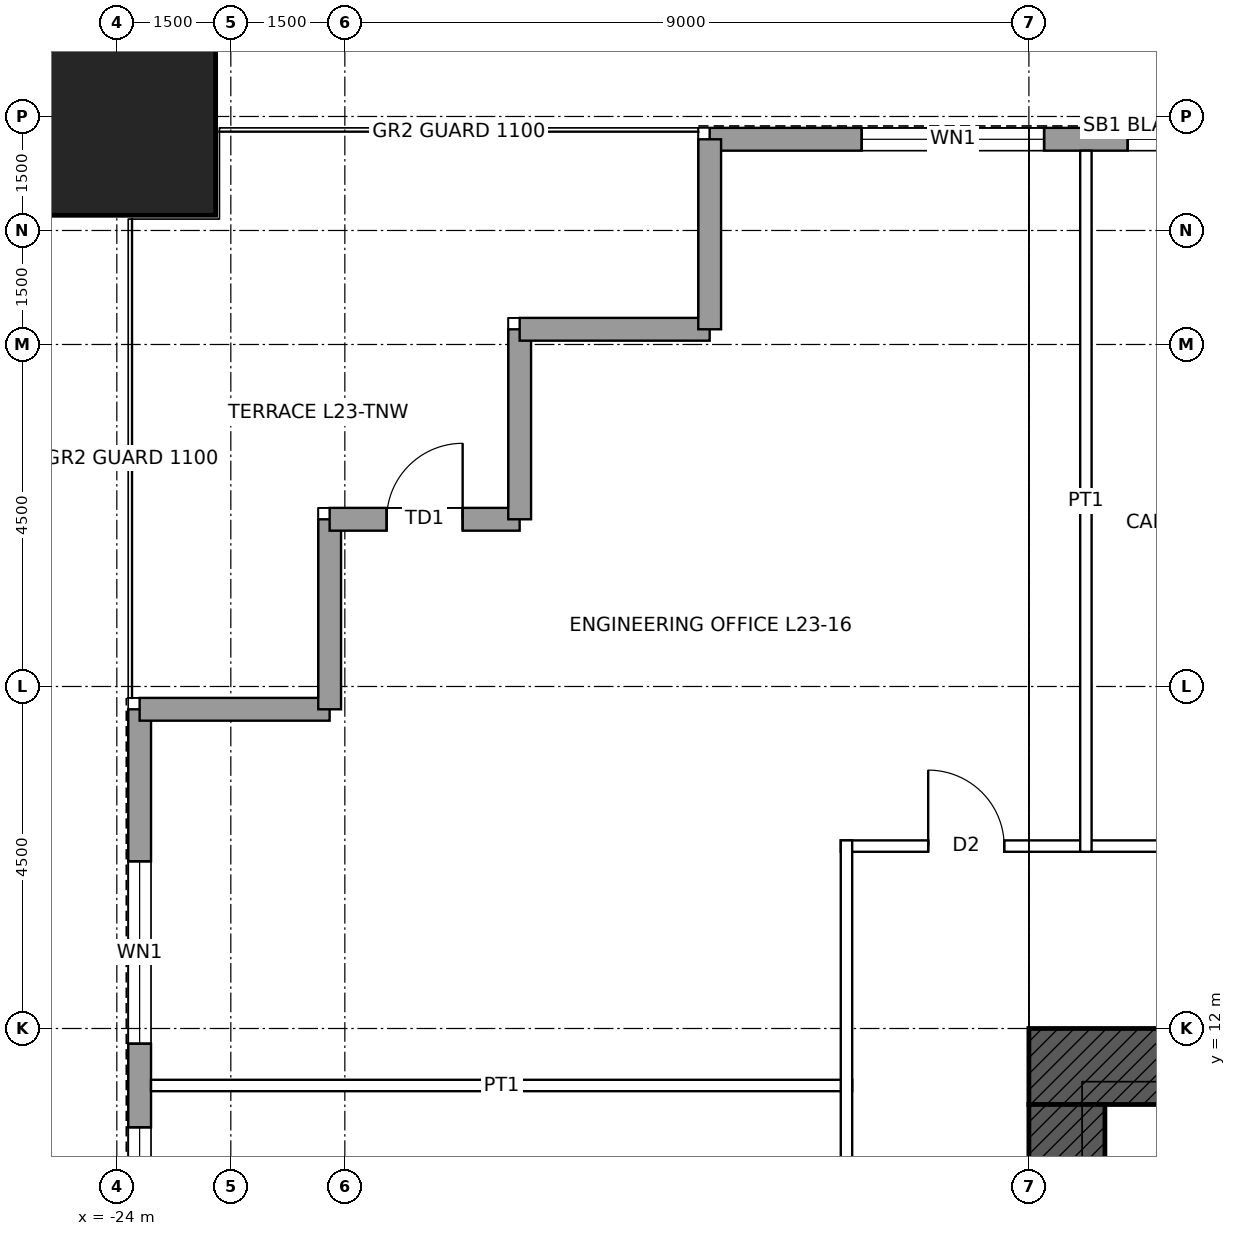
"""IFC4 building model, lengths in metres.
Left out: names, types, materials, properties, quantities, classifications, styles, units other than length and angle.
Written with IfcOpenShell. Run it as: python <this file> out.ifc"""

import sys

from ifc_helpers import new_model, si_unit, direction, frame, frame_2d, origin, origin_2d, place, context, subcontext, project, spatial, rectangle, hollow_rectangle, extrude, element, fill, save


model = new_model("IFC4")
c1 = context("Model", 3, precision=1e-05, world=origin(), true_north=direction((0.0, 1.0)))
c2 = subcontext(c1, "Body", "Model", "MODEL_VIEW")
j1 = project(units=[si_unit("LENGTHUNIT", "METRE"), si_unit("PLANEANGLEUNIT", "RADIAN")], contexts=[c1])
p1 = place(None, origin())
s1 = spatial("IfcSite", under=j1, at=p1, CompositionType="ELEMENT")
p2 = place(p1, origin())
s2 = spatial("IfcBuilding", under=s1, at=p2, CompositionType="ELEMENT")
p3 = place(p2, frame((0.0, 0.0, 117.9)))
s3 = spatial("IfcBuildingStorey", under=s2, at=p3, CompositionType="ELEMENT", Elevation=117.9)
p4 = place(p3, frame((-24.0, 24.0, 0.0), z_axis=(0.0, 0.0, 1.0), x_axis=(1.0, 0.0, 0.0)))
e1 = element("IfcColumn", 1, at=p4, inside=s3, PredefinedType="COLUMN", context=c2, shape_type="SweptSolid", body=[
    extrude(hollow_rectangle(XDim=2.6, YDim=2.6, WallThickness=0.13, at=origin_2d()), origin(), (0.0, 0.0, 1.0), 4.5),
])
p5 = place(p3, frame((-12.0, 11.5, 0.0), z_axis=(0.0, 0.0, 1.0), x_axis=(1.0, 0.0, 0.0)))
e2 = element("IfcWall", 2, at=p5, inside=s3, PredefinedType="SHEAR", context=c2, shape_type="SweptSolid", body=[
    extrude(rectangle(XDim=24.0, YDim=1.0, at=frame_2d((12.0, 0.0))), origin(), (0.0, 0.0, 1.0), 4.5),
])
p6 = place(p5, frame((6.25, 0.0, 0.0)))
e3 = element("IfcOpeningElement", 3, at=p6, cuts=e2, PredefinedType="OPENING", context=c2, shape_type="SweptSolid", body=[
    extrude(rectangle(XDim=1.0, YDim=2.4, at=frame_2d((0.5, 1.2))), frame((0.0, 0.51, 0.0), z_axis=(0.0, -1.0, 0.0), x_axis=(1.0, 0.0, 0.0)), (0.0, 0.0, 1.0), 1.02),
])
p7 = place(p5, frame((16.75, 0.0, 0.0)))
e4 = element("IfcOpeningElement", 4, at=p7, cuts=e2, PredefinedType="OPENING", context=c2, shape_type="SweptSolid", body=[
    extrude(rectangle(XDim=1.0, YDim=2.4, at=frame_2d((0.5, 1.2))), frame((0.0, 0.51, 0.0), z_axis=(0.0, -1.0, 0.0), x_axis=(1.0, 0.0, 0.0)), (0.0, 0.0, 1.0), 1.02),
])
p8 = place(p3, frame((-11.5, -11.0, 0.0), z_axis=(0.0, 0.0, 1.0), x_axis=(0.0, 1.0, 0.0)))
e5 = element("IfcWall", 5, at=p8, inside=s3, PredefinedType="SHEAR", context=c2, shape_type="SweptSolid", body=[
    extrude(rectangle(XDim=22.0, YDim=1.0, at=frame_2d((11.0, 0.0))), origin(), (0.0, 0.0, 1.0), 4.5),
])
p9 = place(p8, frame((10.5, 0.0, 0.0)))
e6 = element("IfcOpeningElement", 6, at=p9, cuts=e5, PredefinedType="OPENING", context=c2, shape_type="SweptSolid", body=[
    extrude(rectangle(XDim=1.0, YDim=2.4, at=frame_2d((0.5, 1.2))), frame((0.0, 0.51, 0.0), z_axis=(0.0, -1.0, 0.0), x_axis=(1.0, 0.0, 0.0)), (0.0, 0.0, 1.0), 1.02),
])
p10 = place(p3, frame((-16.2, 23.7, 0.0), z_axis=(0.0, 0.0, 1.0), x_axis=(1.0, 0.0, 0.0)))
e7 = element("IfcWall", 7, at=p10, inside=s3, PredefinedType="SOLIDWALL", context=c2, shape_type="SweptSolid", body=[
    extrude(rectangle(XDim=32.4, YDim=0.3, at=frame_2d((16.2, 0.0))), origin(), (0.0, 0.0, 1.0), 4.3),
])
p11 = place(p10, frame((2.0, 0.0, 1.0)))
e8 = element("IfcOpeningElement", 8, at=p11, cuts=e7, PredefinedType="OPENING", context=c2, shape_type="SweptSolid", body=[
    extrude(rectangle(XDim=2.4, YDim=1.2, at=frame_2d((1.2, 0.6))), frame((0.0, 0.16, 0.0), z_axis=(0.0, -1.0, 0.0), x_axis=(1.0, 0.0, 0.0)), (0.0, 0.0, 1.0), 0.32),
])
p12 = place(p10, frame((5.5, 0.0, 1.0)))
e9 = element("IfcOpeningElement", 9, at=p12, cuts=e7, PredefinedType="OPENING", context=c2, shape_type="SweptSolid", body=[
    extrude(rectangle(XDim=2.4, YDim=1.2, at=frame_2d((1.2, 0.6))), frame((0.0, 0.16, 0.0), z_axis=(0.0, -1.0, 0.0), x_axis=(1.0, 0.0, 0.0)), (0.0, 0.0, 1.0), 0.32),
])
p13 = place(p10, frame((8.45, 0.0, 1.0)))
e10 = element("IfcOpeningElement", 10, at=p13, cuts=e7, PredefinedType="OPENING", context=c2, shape_type="SweptSolid", body=[
    extrude(rectangle(XDim=1.8, YDim=1.2, at=frame_2d((0.9, 0.6))), frame((0.0, 0.16, 0.0), z_axis=(0.0, -1.0, 0.0), x_axis=(1.0, 0.0, 0.0)), (0.0, 0.0, 1.0), 0.32),
])
p14 = place(p10, frame((10.55, 0.0, 1.0)))
e11 = element("IfcOpeningElement", 11, at=p14, cuts=e7, PredefinedType="OPENING", context=c2, shape_type="SweptSolid", body=[
    extrude(rectangle(XDim=1.8, YDim=1.2, at=frame_2d((0.9, 0.6))), frame((0.0, 0.16, 0.0), z_axis=(0.0, -1.0, 0.0), x_axis=(1.0, 0.0, 0.0)), (0.0, 0.0, 1.0), 0.32),
])
p15 = place(p10, frame((15.6, 0.0, 1.0)))
e12 = element("IfcOpeningElement", 12, at=p15, cuts=e7, PredefinedType="OPENING", context=c2, shape_type="SweptSolid", body=[
    extrude(rectangle(XDim=1.8, YDim=1.2, at=frame_2d((0.9, 0.6))), frame((0.0, 0.16, 0.0), z_axis=(0.0, -1.0, 0.0), x_axis=(1.0, 0.0, 0.0)), (0.0, 0.0, 1.0), 0.32),
])
p16 = place(p10, frame((20.5, 0.0, 1.0)))
e13 = element("IfcOpeningElement", 13, at=p16, cuts=e7, PredefinedType="OPENING", context=c2, shape_type="SweptSolid", body=[
    extrude(rectangle(XDim=2.4, YDim=1.2, at=frame_2d((1.2, 0.6))), frame((0.0, 0.16, 0.0), z_axis=(0.0, -1.0, 0.0), x_axis=(1.0, 0.0, 0.0)), (0.0, 0.0, 1.0), 0.32),
])
p17 = place(p10, frame((24.5, 0.0, 1.0)))
e14 = element("IfcOpeningElement", 14, at=p17, cuts=e7, PredefinedType="OPENING", context=c2, shape_type="SweptSolid", body=[
    extrude(rectangle(XDim=2.4, YDim=1.2, at=frame_2d((1.2, 0.6))), frame((0.0, 0.16, 0.0), z_axis=(0.0, -1.0, 0.0), x_axis=(1.0, 0.0, 0.0)), (0.0, 0.0, 1.0), 0.32),
])
p18 = place(p10, frame((28.0, 0.0, 1.0)))
e15 = element("IfcOpeningElement", 15, at=p18, cuts=e7, PredefinedType="OPENING", context=c2, shape_type="SweptSolid", body=[
    extrude(rectangle(XDim=2.4, YDim=1.2, at=frame_2d((1.2, 0.6))), frame((0.0, 0.16, 0.0), z_axis=(0.0, -1.0, 0.0), x_axis=(1.0, 0.0, 0.0)), (0.0, 0.0, 1.0), 0.32),
])
p19 = place(p3, frame((-23.7, -16.2, 0.0), z_axis=(0.0, 0.0, 1.0), x_axis=(0.0, 1.0, 0.0)))
e16 = element("IfcWall", 16, at=p19, inside=s3, PredefinedType="SOLIDWALL", context=c2, shape_type="SweptSolid", body=[
    extrude(rectangle(XDim=32.4, YDim=0.3, at=frame_2d((16.2, 0.0))), origin(), (0.0, 0.0, 1.0), 4.3),
])
p20 = place(p19, frame((2.0, 0.0, 1.0)))
e17 = element("IfcOpeningElement", 17, at=p20, cuts=e16, PredefinedType="OPENING", context=c2, shape_type="SweptSolid", body=[
    extrude(rectangle(XDim=2.4, YDim=1.2, at=frame_2d((1.2, 0.6))), frame((0.0, 0.16, 0.0), z_axis=(0.0, -1.0, 0.0), x_axis=(1.0, 0.0, 0.0)), (0.0, 0.0, 1.0), 0.32),
])
p21 = place(p19, frame((5.5, 0.0, 1.0)))
e18 = element("IfcOpeningElement", 18, at=p21, cuts=e16, PredefinedType="OPENING", context=c2, shape_type="SweptSolid", body=[
    extrude(rectangle(XDim=2.4, YDim=1.2, at=frame_2d((1.2, 0.6))), frame((0.0, 0.16, 0.0), z_axis=(0.0, -1.0, 0.0), x_axis=(1.0, 0.0, 0.0)), (0.0, 0.0, 1.0), 0.32),
])
p22 = place(p19, frame((9.5, 0.0, 1.0)))
e19 = element("IfcOpeningElement", 19, at=p22, cuts=e16, PredefinedType="OPENING", context=c2, shape_type="SweptSolid", body=[
    extrude(rectangle(XDim=2.4, YDim=1.2, at=frame_2d((1.2, 0.6))), frame((0.0, 0.16, 0.0), z_axis=(0.0, -1.0, 0.0), x_axis=(1.0, 0.0, 0.0)), (0.0, 0.0, 1.0), 0.32),
])
p23 = place(p19, frame((15.0, 0.0, 1.0)))
e20 = element("IfcOpeningElement", 20, at=p23, cuts=e16, PredefinedType="OPENING", context=c2, shape_type="SweptSolid", body=[
    extrude(rectangle(XDim=1.8, YDim=1.2, at=frame_2d((0.9, 0.6))), frame((0.0, 0.16, 0.0), z_axis=(0.0, -1.0, 0.0), x_axis=(1.0, 0.0, 0.0)), (0.0, 0.0, 1.0), 0.32),
])
p24 = place(p19, frame((20.05, 0.0, 1.0)))
e21 = element("IfcOpeningElement", 21, at=p24, cuts=e16, PredefinedType="OPENING", context=c2, shape_type="SweptSolid", body=[
    extrude(rectangle(XDim=1.8, YDim=1.2, at=frame_2d((0.9, 0.6))), frame((0.0, 0.16, 0.0), z_axis=(0.0, -1.0, 0.0), x_axis=(1.0, 0.0, 0.0)), (0.0, 0.0, 1.0), 0.32),
])
p25 = place(p19, frame((22.15, 0.0, 1.0)))
e22 = element("IfcOpeningElement", 22, at=p25, cuts=e16, PredefinedType="OPENING", context=c2, shape_type="SweptSolid", body=[
    extrude(rectangle(XDim=1.8, YDim=1.2, at=frame_2d((0.9, 0.6))), frame((0.0, 0.16, 0.0), z_axis=(0.0, -1.0, 0.0), x_axis=(1.0, 0.0, 0.0)), (0.0, 0.0, 1.0), 0.32),
])
p26 = place(p19, frame((24.5, 0.0, 1.0)))
e23 = element("IfcOpeningElement", 23, at=p26, cuts=e16, PredefinedType="OPENING", context=c2, shape_type="SweptSolid", body=[
    extrude(rectangle(XDim=2.4, YDim=1.2, at=frame_2d((1.2, 0.6))), frame((0.0, 0.16, 0.0), z_axis=(0.0, -1.0, 0.0), x_axis=(1.0, 0.0, 0.0)), (0.0, 0.0, 1.0), 0.32),
])
p27 = place(p19, frame((28.0, 0.0, 1.0)))
e24 = element("IfcOpeningElement", 24, at=p27, cuts=e16, PredefinedType="OPENING", context=c2, shape_type="SweptSolid", body=[
    extrude(rectangle(XDim=2.4, YDim=1.2, at=frame_2d((1.2, 0.6))), frame((0.0, 0.16, 0.0), z_axis=(0.0, -1.0, 0.0), x_axis=(1.0, 0.0, 0.0)), (0.0, 0.0, 1.0), 0.32),
])
for number, where, z_axis, x_axis in (
    (25, (-23.7, 16.2, 0.0), (0.0, 0.0, 1.0), (1.0, 0.0, 0.0)),
    (26, (-21.2, 16.2, 0.0), (0.0, 0.0, 1.0), (0.0, 1.0, 0.0)),
):
    element("IfcWall", number, at=place(p3, frame(where, z_axis=z_axis, x_axis=x_axis)), inside=s3, PredefinedType="SOLIDWALL", context=c2, shape_type="SweptSolid", body=[
        extrude(rectangle(XDim=2.5, YDim=0.3, at=frame_2d((1.25, 0.0))), origin(), (0.0, 0.0, 1.0), 4.3),
    ])
p28 = place(p3, frame((-21.2, 18.7, 0.0), z_axis=(0.0, 0.0, 1.0), x_axis=(1.0, 0.0, 0.0)))
e27 = element("IfcWall", 27, at=p28, inside=s3, PredefinedType="SOLIDWALL", context=c2, shape_type="SweptSolid", body=[
    extrude(rectangle(XDim=2.5, YDim=0.3, at=frame_2d((1.25, 0.0))), origin(), (0.0, 0.0, 1.0), 4.3),
])
p29 = place(p28, frame((0.75, 0.0, 0.0)))
e28 = element("IfcOpeningElement", 28, at=p29, cuts=e27, PredefinedType="OPENING", context=c2, shape_type="SweptSolid", body=[
    extrude(rectangle(XDim=1.0, YDim=2.4, at=frame_2d((0.5, 1.2))), frame((0.0, 0.16, 0.0), z_axis=(0.0, -1.0, 0.0), x_axis=(1.0, 0.0, 0.0)), (0.0, 0.0, 1.0), 0.32),
])
for number, where, z_axis, x_axis in (
    (29, (-18.7, 18.7, 0.0), (0.0, 0.0, 1.0), (0.0, 1.0, 0.0)),
    (30, (-18.7, 21.2, 0.0), (0.0, 0.0, 1.0), (1.0, 0.0, 0.0)),
    (31, (-16.2, 21.2, 0.0), (0.0, 0.0, 1.0), (0.0, 1.0, 0.0)),
):
    element("IfcWall", number, at=place(p3, frame(where, z_axis=z_axis, x_axis=x_axis)), inside=s3, PredefinedType="SOLIDWALL", context=c2, shape_type="SweptSolid", body=[
        extrude(rectangle(XDim=2.5, YDim=0.3, at=frame_2d((1.25, 0.0))), origin(), (0.0, 0.0, 1.0), 4.3),
    ])
p30 = place(p3, frame((-23.55, 11.25, 0.0), z_axis=(0.0, 0.0, 1.0), x_axis=(1.0, 0.0, 0.0)))
e32 = element("IfcWall", 32, at=p30, inside=s3, PredefinedType="PARTITIONING", context=c2, shape_type="SweptSolid", body=[
    extrude(rectangle(XDim=9.225, YDim=0.15, at=frame_2d((4.613, 0.0))), origin(), (0.0, 0.0, 1.0), 3.431),
])
p31 = place(p3, frame((-14.475, 14.4, 0.0), z_axis=(0.0, 0.0, 1.0), x_axis=(1.0, 0.0, 0.0)))
e33 = element("IfcWall", 33, at=p31, inside=s3, PredefinedType="PARTITIONING", context=c2, shape_type="SweptSolid", body=[
    extrude(rectangle(XDim=28.95, YDim=0.15, at=frame_2d((14.475, 0.0))), origin(), (0.0, 0.0, 1.0), 4.3),
])
p32 = place(p31, frame((4.2, 0.0, 0.0)))
e34 = element("IfcOpeningElement", 34, at=p32, cuts=e33, PredefinedType="OPENING", context=c2, shape_type="SweptSolid", body=[
    extrude(rectangle(XDim=1.8, YDim=2.4, at=frame_2d((0.9, 1.2))), frame((0.0, 0.085, 0.0), z_axis=(0.0, -1.0, 0.0), x_axis=(1.0, 0.0, 0.0)), (0.0, 0.0, 1.0), 0.17),
])
p33 = place(p31, frame((9.825, 0.0, 0.0)))
e35 = element("IfcOpeningElement", 35, at=p33, cuts=e33, PredefinedType="OPENING", context=c2, shape_type="SweptSolid", body=[
    extrude(rectangle(XDim=1.8, YDim=2.4, at=frame_2d((0.9, 1.2))), frame((0.0, 0.085, 0.0), z_axis=(0.0, -1.0, 0.0), x_axis=(1.0, 0.0, 0.0)), (0.0, 0.0, 1.0), 0.17),
])
p34 = place(p31, frame((17.325, 0.0, 0.0)))
e36 = element("IfcOpeningElement", 36, at=p34, cuts=e33, PredefinedType="OPENING", context=c2, shape_type="SweptSolid", body=[
    extrude(rectangle(XDim=1.8, YDim=2.4, at=frame_2d((0.9, 1.2))), frame((0.0, 0.085, 0.0), z_axis=(0.0, -1.0, 0.0), x_axis=(1.0, 0.0, 0.0)), (0.0, 0.0, 1.0), 0.17),
])
p35 = place(p31, frame((22.95, 0.0, 0.0)))
e37 = element("IfcOpeningElement", 37, at=p35, cuts=e33, PredefinedType="OPENING", context=c2, shape_type="SweptSolid", body=[
    extrude(rectangle(XDim=1.8, YDim=2.4, at=frame_2d((0.9, 1.2))), frame((0.0, 0.085, 0.0), z_axis=(0.0, -1.0, 0.0), x_axis=(1.0, 0.0, 0.0)), (0.0, 0.0, 1.0), 0.17),
])
p36 = place(p31, frame((26.8, 0.0, 0.0)))
e38 = element("IfcOpeningElement", 38, at=p36, cuts=e33, PredefinedType="OPENING", context=c2, shape_type="SweptSolid", body=[
    extrude(rectangle(XDim=1.0, YDim=2.1, at=frame_2d((0.5, 1.05))), frame((0.0, 0.085, 0.0), z_axis=(0.0, -1.0, 0.0), x_axis=(1.0, 0.0, 0.0)), (0.0, 0.0, 1.0), 0.17),
])
p37 = place(p31, frame((1.15, 0.0, 0.0)))
e39 = element("IfcOpeningElement", 39, at=p37, cuts=e33, PredefinedType="OPENING", context=c2, shape_type="SweptSolid", body=[
    extrude(rectangle(XDim=1.0, YDim=2.1, at=frame_2d((0.5, 1.05))), frame((0.0, 0.085, 0.0), z_axis=(0.0, -1.0, 0.0), x_axis=(1.0, 0.0, 0.0)), (0.0, 0.0, 1.0), 0.17),
])
p38 = place(p3, frame((-14.4, -14.475, 0.0), z_axis=(0.0, 0.0, 1.0), x_axis=(0.0, 1.0, 0.0)))
e40 = element("IfcWall", 40, at=p38, inside=s3, PredefinedType="PARTITIONING", context=c2, shape_type="SweptSolid", body=[
    extrude(rectangle(XDim=28.95, YDim=0.15, at=frame_2d((14.475, 0.0))), origin(), (0.0, 0.0, 1.0), 4.3),
])
p39 = place(p38, frame((6.075, 0.0, 0.0)))
e41 = element("IfcOpeningElement", 41, at=p39, cuts=e40, PredefinedType="OPENING", context=c2, shape_type="SweptSolid", body=[
    extrude(rectangle(XDim=1.8, YDim=2.4, at=frame_2d((0.9, 1.2))), frame((0.0, 0.085, 0.0), z_axis=(0.0, -1.0, 0.0), x_axis=(1.0, 0.0, 0.0)), (0.0, 0.0, 1.0), 0.17),
])
p40 = place(p38, frame((17.325, 0.0, 0.0)))
e42 = element("IfcOpeningElement", 42, at=p40, cuts=e40, PredefinedType="OPENING", context=c2, shape_type="SweptSolid", body=[
    extrude(rectangle(XDim=1.8, YDim=2.4, at=frame_2d((0.9, 1.2))), frame((0.0, 0.085, 0.0), z_axis=(0.0, -1.0, 0.0), x_axis=(1.0, 0.0, 0.0)), (0.0, 0.0, 1.0), 0.17),
])
p41 = place(p3, frame((-11.25, 14.325, 0.0), z_axis=(0.0, 0.0, 1.0), x_axis=(0.0, 1.0, 0.0)))
e43 = element("IfcWall", 43, at=p41, inside=s3, PredefinedType="PARTITIONING", context=c2, shape_type="SweptSolid", body=[
    extrude(rectangle(XDim=9.225, YDim=0.15, at=frame_2d((4.613, 0.0))), origin(), (0.0, 0.0, 1.0), 3.431),
])
p42 = place(p11, origin())
e44 = element("IfcWindow", 44, at=p42, inside=s3, PartitioningType="SINGLE_PANEL", PredefinedType="WINDOW", context=c2, shape_type="SweptSolid", body=[
    extrude(rectangle(XDim=2.4, YDim=1.2, at=frame_2d((1.2, 0.6))), frame((0.0, 0.03, 0.0), z_axis=(0.0, -1.0, 0.0), x_axis=(1.0, 0.0, 0.0)), (0.0, 0.0, 1.0), 0.06),
])
fill(e8, e44)
p43 = place(p12, origin())
e45 = element("IfcWindow", 45, at=p43, inside=s3, PartitioningType="SINGLE_PANEL", PredefinedType="WINDOW", context=c2, shape_type="SweptSolid", body=[
    extrude(rectangle(XDim=2.4, YDim=1.2, at=frame_2d((1.2, 0.6))), frame((0.0, 0.03, 0.0), z_axis=(0.0, -1.0, 0.0), x_axis=(1.0, 0.0, 0.0)), (0.0, 0.0, 1.0), 0.06),
])
fill(e9, e45)
p44 = place(p26, origin())
e46 = element("IfcWindow", 46, at=p44, inside=s3, PartitioningType="SINGLE_PANEL", PredefinedType="WINDOW", context=c2, shape_type="SweptSolid", body=[
    extrude(rectangle(XDim=2.4, YDim=1.2, at=frame_2d((1.2, 0.6))), frame((0.0, 0.03, 0.0), z_axis=(0.0, -1.0, 0.0), x_axis=(1.0, 0.0, 0.0)), (0.0, 0.0, 1.0), 0.06),
])
fill(e23, e46)
p45 = place(p27, origin())
e47 = element("IfcWindow", 47, at=p45, inside=s3, PartitioningType="SINGLE_PANEL", PredefinedType="WINDOW", context=c2, shape_type="SweptSolid", body=[
    extrude(rectangle(XDim=2.4, YDim=1.2, at=frame_2d((1.2, 0.6))), frame((0.0, 0.03, 0.0), z_axis=(0.0, -1.0, 0.0), x_axis=(1.0, 0.0, 0.0)), (0.0, 0.0, 1.0), 0.06),
])
fill(e24, e47)
p46 = place(p29, origin())
e48 = element("IfcDoor", 48, at=p46, inside=s3, OperationType="SINGLE_SWING_RIGHT", PredefinedType="DOOR", context=c2, shape_type="SweptSolid", body=[
    extrude(rectangle(XDim=1.0, YDim=2.4, at=frame_2d((0.5, 1.2))), frame((0.0, 0.025, 0.0), z_axis=(0.0, -1.0, 0.0), x_axis=(1.0, 0.0, 0.0)), (0.0, 0.0, 1.0), 0.05),
])
fill(e28, e48)
p47 = place(p37, origin())
e49 = element("IfcDoor", 49, at=p47, inside=s3, OperationType="SINGLE_SWING_LEFT", PredefinedType="DOOR", context=c2, shape_type="SweptSolid", body=[
    extrude(rectangle(XDim=1.0, YDim=2.1, at=frame_2d((0.5, 1.05))), frame((0.0, 0.025, 0.0), z_axis=(0.0, -1.0, 0.0), x_axis=(1.0, 0.0, 0.0)), (0.0, 0.0, 1.0), 0.05),
])
fill(e39, e49)
save(model, sys.argv[1])
